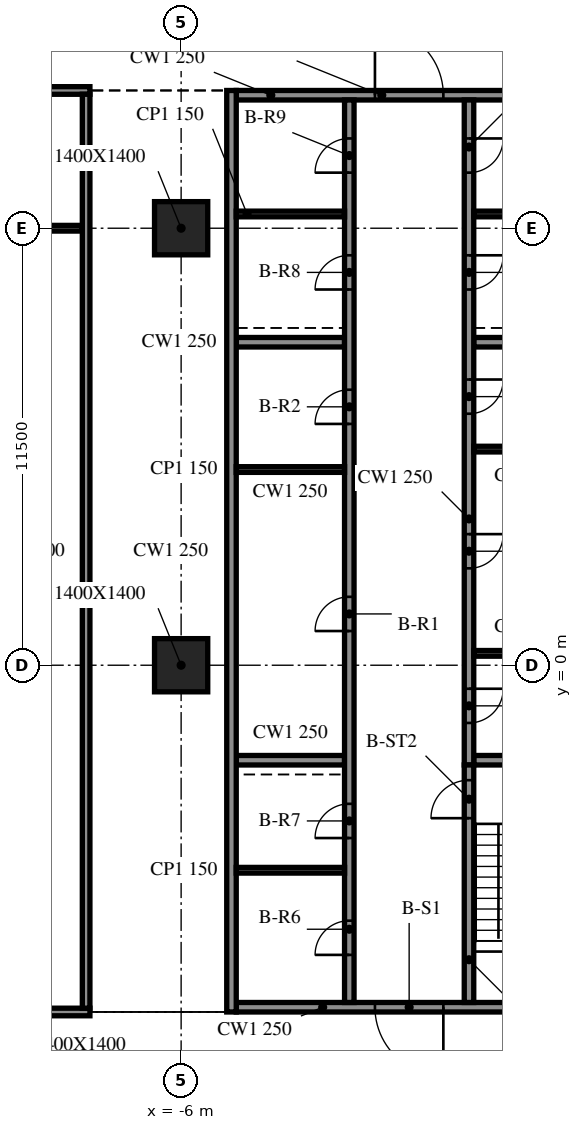
"""IFC4 building model, lengths in metres.
Left out: names, types, materials, properties, quantities, classifications, styles, units other than length and angle.
Written with IfcOpenShell. Run it as: python <this file> out.ifc"""

import sys

from ifc_helpers import new_model, si_unit, direction, frame, frame_2d, origin, origin_2d, place, context, subcontext, project, spatial, rectangle, extrude, element, fill, save


model = new_model("IFC4")
c1 = context("Model", 3, precision=1e-05, world=origin(), true_north=direction((0.0, 1.0)))
c2 = subcontext(c1, "Body", "Model", "MODEL_VIEW")
j1 = project(units=[si_unit("LENGTHUNIT", "METRE"), si_unit("PLANEANGLEUNIT", "RADIAN")], contexts=[c1])
p1 = place(None, origin())
s1 = spatial("IfcSite", under=j1, at=p1, CompositionType="ELEMENT")
p2 = place(p1, origin())
s2 = spatial("IfcBuilding", under=s1, at=p2, CompositionType="ELEMENT")
p3 = place(p2, frame((0.0, 0.0, 84.8)))
s3 = spatial("IfcBuildingStorey", under=s2, at=p3, CompositionType="ELEMENT", Elevation=84.8)
for number, where, z_axis, x_axis in (
    (1, (-6.0, 0.0, -0.34), (0.0, 0.0, 1.0), (1.0, 0.0, 0.0)),
    (2, (-6.0, 11.5, -0.34), (0.0, 0.0, 1.0), (1.0, 0.0, 0.0)),
):
    element("IfcColumn", number, at=place(p3, frame(where, z_axis=z_axis, x_axis=x_axis)), inside=s3, PredefinedType="COLUMN", context=c2, shape_type="SweptSolid", body=[
        extrude(rectangle(XDim=1.4, YDim=1.4, at=origin_2d()), origin(), (0.0, 0.0, 1.0), 4.1),
    ])
p4 = place(p3, frame((-4.675, 15.125, 0.0), z_axis=(0.0, 0.0, 1.0), x_axis=(0.0, -1.0, 0.0)))
e3 = element("IfcWall", 3, at=p4, inside=s3, PredefinedType="SOLIDWALL", context=c2, shape_type="SweptSolid", body=[
    extrude(rectangle(XDim=24.25, YDim=0.25, at=frame_2d((12.125, 0.0))), origin(), (0.0, 0.0, 1.0), 3.76),
])
p5 = place(p3, frame((4.55, -9.0, 0.0), z_axis=(0.0, 0.0, 1.0), x_axis=(-1.0, 0.0, 0.0)))
e4 = element("IfcWall", 4, at=p5, inside=s3, PredefinedType="SOLIDWALL", context=c2, shape_type="SweptSolid", body=[
    extrude(rectangle(XDim=9.1, YDim=0.25, at=frame_2d((4.55, 0.0))), origin(), (0.0, 0.0, 1.0), 3.76),
])
p6 = place(p5, frame((3.65, 0.0, 0.0)))
e5 = element("IfcOpeningElement", 5, at=p6, cuts=e4, PredefinedType="OPENING", context=c2, shape_type="SweptSolid", body=[
    extrude(rectangle(XDim=1.8, YDim=2.1, at=frame_2d((0.9, 1.05))), frame((0.0, 0.135, 0.0), z_axis=(0.0, -1.0, 0.0), x_axis=(1.0, 0.0, 0.0)), (0.0, 0.0, 1.0), 0.27),
])
p7 = place(p3, frame((-4.55, 15.0, 0.0), z_axis=(0.0, 0.0, 1.0), x_axis=(1.0, 0.0, 0.0)))
e6 = element("IfcWall", 6, at=p7, inside=s3, PredefinedType="SOLIDWALL", context=c2, shape_type="SweptSolid", body=[
    extrude(rectangle(XDim=9.1, YDim=0.25, at=frame_2d((4.55, 0.0))), origin(), (0.0, 0.0, 1.0), 3.76),
])
p8 = place(p7, frame((3.65, 0.0, 0.0)))
e7 = element("IfcOpeningElement", 7, at=p8, cuts=e6, PredefinedType="OPENING", context=c2, shape_type="SweptSolid", body=[
    extrude(rectangle(XDim=1.8, YDim=2.1, at=frame_2d((0.9, 1.05))), frame((0.0, 0.135, 0.0), z_axis=(0.0, -1.0, 0.0), x_axis=(1.0, 0.0, 0.0)), (0.0, 0.0, 1.0), 0.27),
])
p9 = place(p3, frame((-1.575, -8.875, 0.0), z_axis=(0.0, 0.0, 1.0), x_axis=(0.0, 1.0, 0.0)))
e8 = element("IfcWall", 8, at=p9, inside=s3, PredefinedType="SOLIDWALL", context=c2, shape_type="SweptSolid", body=[
    extrude(rectangle(XDim=23.75, YDim=0.25, at=frame_2d((11.875, 0.0))), origin(), (0.0, 0.0, 1.0), 3.76),
])
p10 = place(p9, frame((9.775, 0.0, 0.0)))
e9 = element("IfcOpeningElement", 9, at=p10, cuts=e8, PredefinedType="OPENING", context=c2, shape_type="SweptSolid", body=[
    extrude(rectangle(XDim=0.9, YDim=2.1, at=frame_2d((0.45, 1.05))), frame((0.0, 0.135, 0.0), z_axis=(0.0, -1.0, 0.0), x_axis=(1.0, 0.0, 0.0)), (0.0, 0.0, 1.0), 0.27),
])
p11 = place(p9, frame((15.225, 0.0, 0.0)))
e10 = element("IfcOpeningElement", 10, at=p11, cuts=e8, PredefinedType="OPENING", context=c2, shape_type="SweptSolid", body=[
    extrude(rectangle(XDim=0.9, YDim=2.1, at=frame_2d((0.45, 1.05))), frame((0.0, 0.135, 0.0), z_axis=(0.0, -1.0, 0.0), x_axis=(1.0, 0.0, 0.0)), (0.0, 0.0, 1.0), 0.27),
])
p12 = place(p9, frame((1.252, 0.0, 0.0)))
e11 = element("IfcOpeningElement", 11, at=p12, cuts=e8, PredefinedType="OPENING", context=c2, shape_type="SweptSolid", body=[
    extrude(rectangle(XDim=0.9, YDim=2.1, at=frame_2d((0.45, 1.05))), frame((0.0, 0.135, 0.0), z_axis=(0.0, -1.0, 0.0), x_axis=(1.0, 0.0, 0.0)), (0.0, 0.0, 1.0), 0.27),
])
p13 = place(p9, frame((4.327, 0.0, 0.0)))
e12 = element("IfcOpeningElement", 12, at=p13, cuts=e8, PredefinedType="OPENING", context=c2, shape_type="SweptSolid", body=[
    extrude(rectangle(XDim=0.9, YDim=2.1, at=frame_2d((0.45, 1.05))), frame((0.0, 0.135, 0.0), z_axis=(0.0, -1.0, 0.0), x_axis=(1.0, 0.0, 0.0)), (0.0, 0.0, 1.0), 0.27),
])
p14 = place(p9, frame((18.762, 0.0, 0.0)))
e13 = element("IfcOpeningElement", 13, at=p14, cuts=e8, PredefinedType="OPENING", context=c2, shape_type="SweptSolid", body=[
    extrude(rectangle(XDim=0.9, YDim=2.1, at=frame_2d((0.45, 1.05))), frame((0.0, 0.135, 0.0), z_axis=(0.0, -1.0, 0.0), x_axis=(1.0, 0.0, 0.0)), (0.0, 0.0, 1.0), 0.27),
])
p15 = place(p9, frame((21.837, 0.0, 0.0)))
e14 = element("IfcOpeningElement", 14, at=p15, cuts=e8, PredefinedType="OPENING", context=c2, shape_type="SweptSolid", body=[
    extrude(rectangle(XDim=0.9, YDim=2.1, at=frame_2d((0.45, 1.05))), frame((0.0, 0.135, 0.0), z_axis=(0.0, -1.0, 0.0), x_axis=(1.0, 0.0, 0.0)), (0.0, 0.0, 1.0), 0.27),
])
p16 = place(p3, frame((1.575, -8.875, 0.0), z_axis=(0.0, 0.0, 1.0), x_axis=(0.0, 1.0, 0.0)))
e15 = element("IfcWall", 15, at=p16, inside=s3, PredefinedType="SOLIDWALL", context=c2, shape_type="SweptSolid", body=[
    extrude(rectangle(XDim=6.25, YDim=0.25, at=frame_2d((3.125, 0.0))), origin(), (0.0, 0.0, 1.0), 3.76),
])
p17 = place(p16, frame((4.85, 0.0, 0.0)))
e16 = element("IfcOpeningElement", 16, at=p17, cuts=e15, PredefinedType="OPENING", context=c2, shape_type="SweptSolid", body=[
    extrude(rectangle(XDim=1.0, YDim=2.1, at=frame_2d((0.5, 1.05))), frame((0.0, 0.135, 0.0), z_axis=(0.0, -1.0, 0.0), x_axis=(1.0, 0.0, 0.0)), (0.0, 0.0, 1.0), 0.27),
])
p18 = place(p3, frame((1.575, 14.875, 0.0), z_axis=(0.0, 0.0, 1.0), x_axis=(0.0, -1.0, 0.0)))
e17 = element("IfcWall", 17, at=p18, inside=s3, PredefinedType="SOLIDWALL", context=c2, shape_type="SweptSolid", body=[
    extrude(rectangle(XDim=17.5, YDim=0.25, at=frame_2d((8.75, 0.0))), origin(), (0.0, 0.0, 1.0), 3.76),
])
p19 = place(p18, frame((15.494, 0.0, 0.0)))
e18 = element("IfcOpeningElement", 18, at=p19, cuts=e17, PredefinedType="OPENING", context=c2, shape_type="SweptSolid", body=[
    extrude(rectangle(XDim=0.9, YDim=2.1, at=frame_2d((0.45, 1.05))), frame((0.0, 0.135, 0.0), z_axis=(0.0, -1.0, 0.0), x_axis=(1.0, 0.0, 0.0)), (0.0, 0.0, 1.0), 0.27),
])
p20 = place(p18, frame((11.425, 0.0, 0.0)))
e19 = element("IfcOpeningElement", 19, at=p20, cuts=e17, PredefinedType="OPENING", context=c2, shape_type="SweptSolid", body=[
    extrude(rectangle(XDim=0.9, YDim=2.1, at=frame_2d((0.45, 1.05))), frame((0.0, 0.135, 0.0), z_axis=(0.0, -1.0, 0.0), x_axis=(1.0, 0.0, 0.0)), (0.0, 0.0, 1.0), 0.27),
])
p21 = place(p18, frame((7.356, 0.0, 0.0)))
e20 = element("IfcOpeningElement", 20, at=p21, cuts=e17, PredefinedType="OPENING", context=c2, shape_type="SweptSolid", body=[
    extrude(rectangle(XDim=0.9, YDim=2.1, at=frame_2d((0.45, 1.05))), frame((0.0, 0.135, 0.0), z_axis=(0.0, -1.0, 0.0), x_axis=(1.0, 0.0, 0.0)), (0.0, 0.0, 1.0), 0.27),
])
p22 = place(p18, frame((4.087, 0.0, 0.0)))
e21 = element("IfcOpeningElement", 21, at=p22, cuts=e17, PredefinedType="OPENING", context=c2, shape_type="SweptSolid", body=[
    extrude(rectangle(XDim=0.9, YDim=2.1, at=frame_2d((0.45, 1.05))), frame((0.0, 0.135, 0.0), z_axis=(0.0, -1.0, 0.0), x_axis=(1.0, 0.0, 0.0)), (0.0, 0.0, 1.0), 0.27),
])
p23 = place(p18, frame((1.012, 0.0, 0.0)))
e22 = element("IfcOpeningElement", 22, at=p23, cuts=e17, PredefinedType="OPENING", context=c2, shape_type="SweptSolid", body=[
    extrude(rectangle(XDim=0.9, YDim=2.1, at=frame_2d((0.45, 1.05))), frame((0.0, 0.135, 0.0), z_axis=(0.0, -1.0, 0.0), x_axis=(1.0, 0.0, 0.0)), (0.0, 0.0, 1.0), 0.27),
])
for number, where, z_axis, x_axis in (
    (23, (-4.55, -2.5, 0.0), (0.0, 0.0, 1.0), (1.0, 0.0, 0.0)),
    (24, (-4.55, 8.5, 0.0), (0.0, 0.0, 1.0), (1.0, 0.0, 0.0)),
    (25, (1.7, -2.5, 0.0), (0.0, 0.0, 1.0), (1.0, 0.0, 0.0)),
    (26, (1.7, 8.5, 0.0), (0.0, 0.0, 1.0), (1.0, 0.0, 0.0)),
):
    element("IfcWall", number, at=place(p3, frame(where, z_axis=z_axis, x_axis=x_axis)), inside=s3, PredefinedType="SOLIDWALL", context=c2, shape_type="SweptSolid", body=[
        extrude(rectangle(XDim=2.85, YDim=0.25, at=frame_2d((1.425, 0.0))), origin(), (0.0, 0.0, 1.0), 3.76),
    ])
for number, where, z_axis, x_axis in (
    (27, (-4.55, 5.15, 0.0), (0.0, 0.0, 1.0), (1.0, 0.0, 0.0)),
    (28, (1.7, 0.312, 0.0), (0.0, 0.0, 1.0), (1.0, 0.0, 0.0)),
    (29, (1.7, 5.688, 0.0), (0.0, 0.0, 1.0), (1.0, 0.0, 0.0)),
    (30, (-4.55, -5.395, 0.0), (0.0, 0.0, 1.0), (1.0, 0.0, 0.0)),
    (31, (-4.55, 11.875, 0.0), (0.0, 0.0, 1.0), (1.0, 0.0, 0.0)),
    (32, (1.7, 11.875, 0.0), (0.0, 0.0, 1.0), (1.0, 0.0, 0.0)),
):
    element("IfcWall", number, at=place(p3, frame(where, z_axis=z_axis, x_axis=x_axis)), inside=s3, PredefinedType="PARTITIONING", context=c2, shape_type="SweptSolid", body=[
        extrude(rectangle(XDim=2.85, YDim=0.15, at=frame_2d((1.425, 0.0))), origin(), (0.0, 0.0, 1.0), 3.76),
    ])
p24 = place(p3, frame((-15.7, -9.125, 0.0), z_axis=(0.0, 0.0, 1.0), x_axis=(1.0, 0.0, 0.0)))
e33 = element("IfcWall", 33, at=p24, inside=s3, PredefinedType="PARTITIONING", context=c2, shape_type="SweptSolid", body=[
    extrude(rectangle(XDim=7.3, YDim=0.2, at=frame_2d((3.65, 0.0))), origin(), (0.0, 0.0, 1.0), 3.76),
])
p25 = place(p3, frame((-15.5, 11.5, 0.0), z_axis=(0.0, 0.0, 1.0), x_axis=(1.0, 0.0, 0.0)))
e34 = element("IfcWall", 34, at=p25, inside=s3, PredefinedType="PARTITIONING", context=c2, shape_type="SweptSolid", body=[
    extrude(rectangle(XDim=6.9, YDim=0.15, at=frame_2d((3.45, 0.0))), origin(), (0.0, 0.0, 1.0), 3.76),
])
p26 = place(p3, frame((-15.7, 15.125, 0.0), z_axis=(0.0, 0.0, 1.0), x_axis=(1.0, 0.0, 0.0)))
e35 = element("IfcWall", 35, at=p26, inside=s3, PredefinedType="PARTITIONING", context=c2, shape_type="SweptSolid", body=[
    extrude(rectangle(XDim=7.3, YDim=0.2, at=frame_2d((3.65, 0.0))), origin(), (0.0, 0.0, 1.0), 3.76),
])
p27 = place(p26, frame((3.1, 0.0, 0.0)))
e36 = element("IfcOpeningElement", 36, at=p27, cuts=e35, PredefinedType="OPENING", context=c2, shape_type="SweptSolid", body=[
    extrude(rectangle(XDim=0.9, YDim=2.1, at=frame_2d((0.45, 1.05))), frame((0.0, 0.11, 0.0), z_axis=(0.0, -1.0, 0.0), x_axis=(1.0, 0.0, 0.0)), (0.0, 0.0, 1.0), 0.22),
])
p28 = place(p3, frame((-8.5, -9.025, 0.0), z_axis=(0.0, 0.0, 1.0), x_axis=(0.0, 1.0, 0.0)))
e37 = element("IfcWall", 37, at=p28, inside=s3, PredefinedType="PARTITIONING", context=c2, shape_type="SweptSolid", body=[
    extrude(rectangle(XDim=24.05, YDim=0.2, at=frame_2d((12.025, 0.0))), origin(), (0.0, 0.0, 1.0), 3.76),
])
p29 = place(p6, origin())
e38 = element("IfcDoor", 38, at=p29, inside=s3, OperationType="DOUBLE_DOOR_SINGLE_SWING", PredefinedType="DOOR", context=c2, shape_type="SweptSolid", body=[
    extrude(rectangle(XDim=1.8, YDim=2.1, at=frame_2d((0.9, 1.05))), frame((0.0, 0.025, 0.0), z_axis=(0.0, -1.0, 0.0), x_axis=(1.0, 0.0, 0.0)), (0.0, 0.0, 1.0), 0.05),
])
fill(e5, e38)
p30 = place(p8, origin())
e39 = element("IfcDoor", 39, at=p30, inside=s3, OperationType="DOUBLE_DOOR_SINGLE_SWING", PredefinedType="DOOR", context=c2, shape_type="SweptSolid", body=[
    extrude(rectangle(XDim=1.8, YDim=2.1, at=frame_2d((0.9, 1.05))), frame((0.0, 0.025, 0.0), z_axis=(0.0, -1.0, 0.0), x_axis=(1.0, 0.0, 0.0)), (0.0, 0.0, 1.0), 0.05),
])
fill(e7, e39)
p31 = place(p10, origin())
e40 = element("IfcDoor", 40, at=p31, inside=s3, OperationType="SINGLE_SWING_LEFT", PredefinedType="DOOR", context=c2, shape_type="SweptSolid", body=[
    extrude(rectangle(XDim=0.9, YDim=2.1, at=frame_2d((0.45, 1.05))), frame((0.0, 0.025, 0.0), z_axis=(0.0, -1.0, 0.0), x_axis=(1.0, 0.0, 0.0)), (0.0, 0.0, 1.0), 0.05),
])
fill(e9, e40)
p32 = place(p11, origin())
e41 = element("IfcDoor", 41, at=p32, inside=s3, OperationType="SINGLE_SWING_RIGHT", PredefinedType="DOOR", context=c2, shape_type="SweptSolid", body=[
    extrude(rectangle(XDim=0.9, YDim=2.1, at=frame_2d((0.45, 1.05))), frame((0.0, 0.025, 0.0), z_axis=(0.0, -1.0, 0.0), x_axis=(1.0, 0.0, 0.0)), (0.0, 0.0, 1.0), 0.05),
])
fill(e10, e41)
p33 = place(p19, origin())
e42 = element("IfcDoor", 42, at=p33, inside=s3, OperationType="SINGLE_SWING_LEFT", PredefinedType="DOOR", context=c2, shape_type="SweptSolid", body=[
    extrude(rectangle(XDim=0.9, YDim=2.1, at=frame_2d((0.45, 1.05))), frame((0.0, 0.025, 0.0), z_axis=(0.0, -1.0, 0.0), x_axis=(1.0, 0.0, 0.0)), (0.0, 0.0, 1.0), 0.05),
])
fill(e18, e42)
p34 = place(p20, origin())
e43 = element("IfcDoor", 43, at=p34, inside=s3, OperationType="SINGLE_SWING_RIGHT", PredefinedType="DOOR", context=c2, shape_type="SweptSolid", body=[
    extrude(rectangle(XDim=0.9, YDim=2.1, at=frame_2d((0.45, 1.05))), frame((0.0, 0.025, 0.0), z_axis=(0.0, -1.0, 0.0), x_axis=(1.0, 0.0, 0.0)), (0.0, 0.0, 1.0), 0.05),
])
fill(e19, e43)
p35 = place(p21, origin())
e44 = element("IfcDoor", 44, at=p35, inside=s3, OperationType="SINGLE_SWING_LEFT", PredefinedType="DOOR", context=c2, shape_type="SweptSolid", body=[
    extrude(rectangle(XDim=0.9, YDim=2.1, at=frame_2d((0.45, 1.05))), frame((0.0, 0.025, 0.0), z_axis=(0.0, -1.0, 0.0), x_axis=(1.0, 0.0, 0.0)), (0.0, 0.0, 1.0), 0.05),
])
fill(e20, e44)
p36 = place(p12, origin())
e45 = element("IfcDoor", 45, at=p36, inside=s3, OperationType="SINGLE_SWING_RIGHT", PredefinedType="DOOR", context=c2, shape_type="SweptSolid", body=[
    extrude(rectangle(XDim=0.9, YDim=2.1, at=frame_2d((0.45, 1.05))), frame((0.0, 0.025, 0.0), z_axis=(0.0, -1.0, 0.0), x_axis=(1.0, 0.0, 0.0)), (0.0, 0.0, 1.0), 0.05),
])
fill(e11, e45)
p37 = place(p13, origin())
e46 = element("IfcDoor", 46, at=p37, inside=s3, OperationType="SINGLE_SWING_LEFT", PredefinedType="DOOR", context=c2, shape_type="SweptSolid", body=[
    extrude(rectangle(XDim=0.9, YDim=2.1, at=frame_2d((0.45, 1.05))), frame((0.0, 0.025, 0.0), z_axis=(0.0, -1.0, 0.0), x_axis=(1.0, 0.0, 0.0)), (0.0, 0.0, 1.0), 0.05),
])
fill(e12, e46)
p38 = place(p14, origin())
e47 = element("IfcDoor", 47, at=p38, inside=s3, OperationType="SINGLE_SWING_RIGHT", PredefinedType="DOOR", context=c2, shape_type="SweptSolid", body=[
    extrude(rectangle(XDim=0.9, YDim=2.1, at=frame_2d((0.45, 1.05))), frame((0.0, 0.025, 0.0), z_axis=(0.0, -1.0, 0.0), x_axis=(1.0, 0.0, 0.0)), (0.0, 0.0, 1.0), 0.05),
])
fill(e13, e47)
p39 = place(p15, origin())
e48 = element("IfcDoor", 48, at=p39, inside=s3, OperationType="SINGLE_SWING_LEFT", PredefinedType="DOOR", context=c2, shape_type="SweptSolid", body=[
    extrude(rectangle(XDim=0.9, YDim=2.1, at=frame_2d((0.45, 1.05))), frame((0.0, 0.025, 0.0), z_axis=(0.0, -1.0, 0.0), x_axis=(1.0, 0.0, 0.0)), (0.0, 0.0, 1.0), 0.05),
])
fill(e14, e48)
p40 = place(p22, origin())
e49 = element("IfcDoor", 49, at=p40, inside=s3, OperationType="SINGLE_SWING_RIGHT", PredefinedType="DOOR", context=c2, shape_type="SweptSolid", body=[
    extrude(rectangle(XDim=0.9, YDim=2.1, at=frame_2d((0.45, 1.05))), frame((0.0, 0.025, 0.0), z_axis=(0.0, -1.0, 0.0), x_axis=(1.0, 0.0, 0.0)), (0.0, 0.0, 1.0), 0.05),
])
fill(e21, e49)
p41 = place(p23, origin())
e50 = element("IfcDoor", 50, at=p41, inside=s3, OperationType="SINGLE_SWING_LEFT", PredefinedType="DOOR", context=c2, shape_type="SweptSolid", body=[
    extrude(rectangle(XDim=0.9, YDim=2.1, at=frame_2d((0.45, 1.05))), frame((0.0, 0.025, 0.0), z_axis=(0.0, -1.0, 0.0), x_axis=(1.0, 0.0, 0.0)), (0.0, 0.0, 1.0), 0.05),
])
fill(e22, e50)
p42 = place(p17, origin())
e51 = element("IfcDoor", 51, at=p42, inside=s3, OperationType="SINGLE_SWING_RIGHT", PredefinedType="DOOR", context=c2, shape_type="SweptSolid", body=[
    extrude(rectangle(XDim=1.0, YDim=2.1, at=frame_2d((0.5, 1.05))), frame((0.0, 0.025, 0.0), z_axis=(0.0, -1.0, 0.0), x_axis=(1.0, 0.0, 0.0)), (0.0, 0.0, 1.0), 0.05),
])
fill(e16, e51)
save(model, sys.argv[1])
